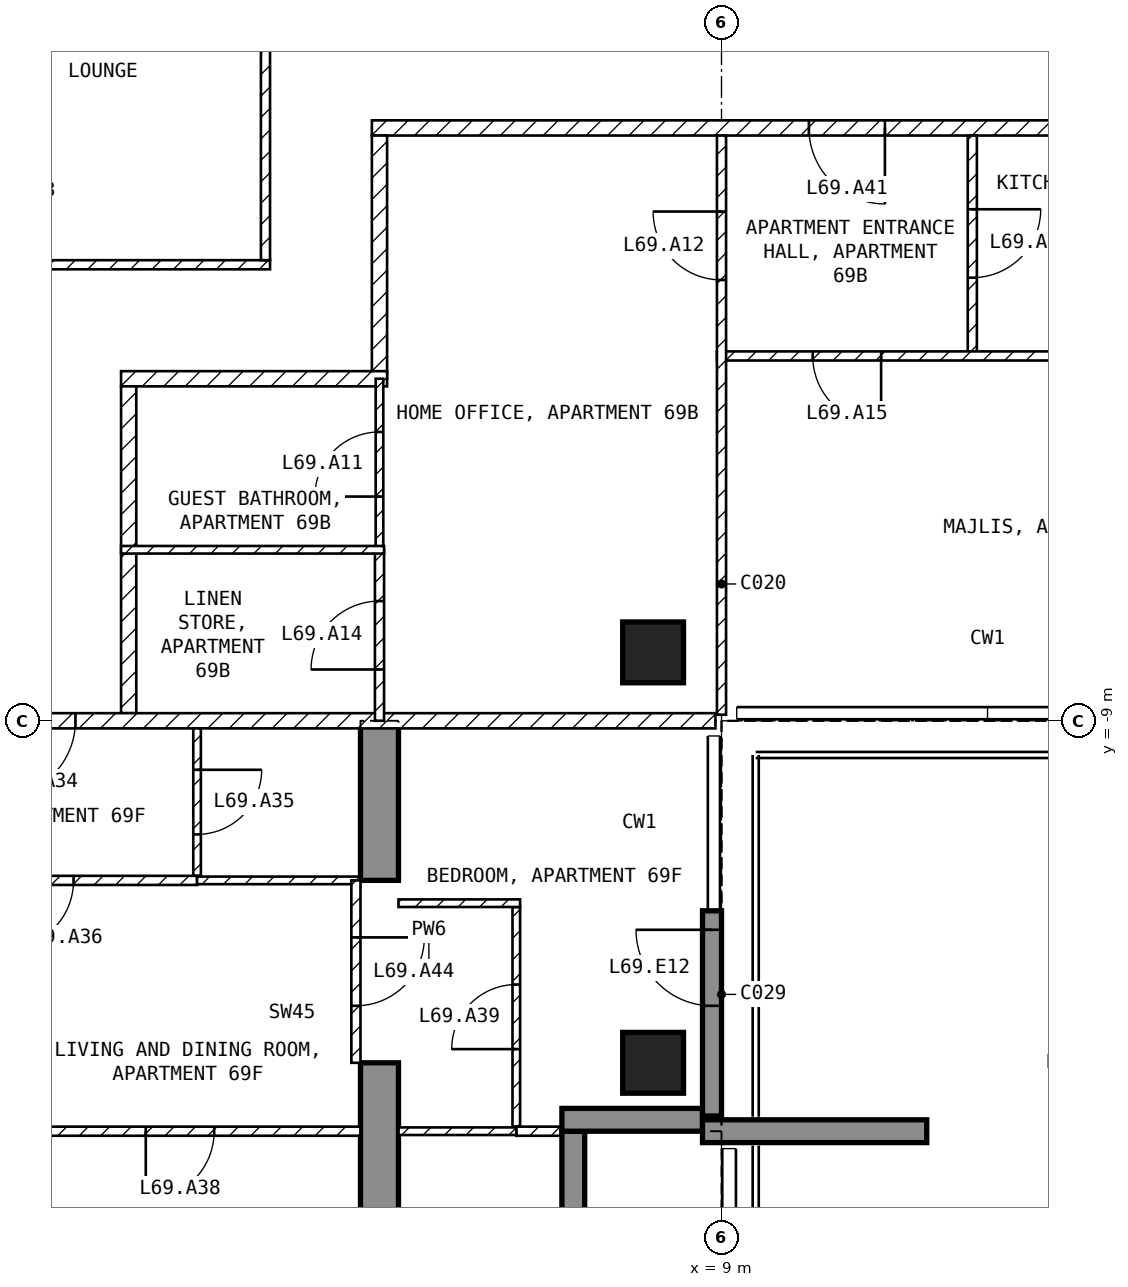
"""IFC4 building model, lengths in metres.
Left out: names, types, materials, properties, quantities, classifications, styles, units other than length and angle.
Written with IfcOpenShell. Run it as: python <this file> out.ifc"""

import sys

from ifc_helpers import new_model, si_unit, direction, frame, frame_2d, origin, origin_2d, place, context, subcontext, project, spatial, polyline, rectangle, outline, extrude, element, fill, save


model = new_model("IFC4")
c1 = context("Model", 3, precision=1e-05, world=origin(), true_north=direction((0.0, 1.0)))
c2 = subcontext(c1, "Body", "Model", "MODEL_VIEW")
j1 = project(units=[si_unit("LENGTHUNIT", "METRE"), si_unit("PLANEANGLEUNIT", "RADIAN")], contexts=[c1])
p1 = place(None, origin())
s1 = spatial("IfcSite", under=j1, at=p1, CompositionType="ELEMENT")
p2 = place(p1, origin())
s2 = spatial("IfcBuilding", under=s1, at=p2, CompositionType="ELEMENT")
p3 = place(p2, frame((0.0, 0.0, 271.0)))
s3 = spatial("IfcBuildingStorey", under=s2, at=p3, CompositionType="ELEMENT", Elevation=271.0)
for number, where, z_axis, x_axis in (
    (1, (8.1, -13.5, -0.25), (0.0, 0.0, 1.0), (1.0, 0.0, 0.0)),
    (2, (8.1, -8.1, -0.25), (0.0, 0.0, 1.0), (1.0, 0.0, 0.0)),
):
    element("IfcColumn", number, at=place(p3, frame(where, z_axis=z_axis, x_axis=x_axis)), inside=s3, PredefinedType="COLUMN", context=c2, shape_type="SweptSolid", body=[
        extrude(rectangle(XDim=0.8, YDim=0.8, at=origin_2d()), origin(), (0.0, 0.0, 1.0), 3.5),
    ])
p4 = place(p3, frame((4.25, -16.7, -0.25), z_axis=(1.0, 0.0, 0.0), x_axis=(0.0, 1.0, 0.0)))
e3 = element("IfcWall", 3, at=p4, inside=s3, PredefinedType="SHEAR", context=c2, shape_type="SweptSolid", body=[
    extrude(outline(polyline([(0.0, 0.0), (3.2, 0.0), (3.2, 2.65), (5.6, 2.65), (5.6, 0.0), (7.7, 0.0), (7.7, 3.5), (0.0, 3.5), (0.0, 0.0)])), origin(), (0.0, 0.0, 1.0), 0.5),
])
p5 = place(p3, frame((8.875, -14.2, 0.0), z_axis=(0.0, 0.0, 1.0), x_axis=(0.0, 1.0, 0.0)))
e4 = element("IfcWall", 4, at=p5, inside=s3, PredefinedType="SOLIDWALL", context=c2, shape_type="SweptSolid", body=[
    extrude(rectangle(XDim=2.7, YDim=0.25, at=frame_2d((1.35, 0.0))), origin(), (0.0, 0.0, 1.0), 3.25),
])
p6 = place(p5, frame((1.45, 0.0, 0.0)))
e5 = element("IfcOpeningElement", 5, at=p6, cuts=e4, PredefinedType="OPENING", context=c2, shape_type="SweptSolid", body=[
    extrude(rectangle(XDim=1.0, YDim=2.4, at=frame_2d((0.5, 1.2))), frame((0.0, 0.135, 0.0), z_axis=(0.0, -1.0, 0.0), x_axis=(1.0, 0.0, 0.0)), (0.0, 0.0, 1.0), 0.27),
])
p7 = place(p3, frame((7.05, -16.2, 0.0), z_axis=(0.0, 0.0, 1.0), x_axis=(0.0, 1.0, 0.0)))
e6 = element("IfcWall", 6, at=p7, inside=s3, PredefinedType="SOLIDWALL", context=c2, shape_type="SweptSolid", body=[
    extrude(rectangle(XDim=1.8, YDim=0.3, at=frame_2d((0.9, 0.0))), origin(), (0.0, 0.0, 1.0), 3.25),
])
p8 = place(p3, frame((6.9, -14.25, 0.0), z_axis=(0.0, 0.0, 1.0), x_axis=(1.0, 0.0, 0.0)))
e7 = element("IfcWall", 7, at=p8, inside=s3, PredefinedType="SOLIDWALL", context=c2, shape_type="SweptSolid", body=[
    extrude(rectangle(XDim=1.85, YDim=0.3, at=frame_2d((0.925, 0.0))), origin(), (0.0, 0.0, 1.0), 3.25),
])
p9 = place(p3, frame((8.75, -14.4, 0.0), z_axis=(0.0, 0.0, 1.0), x_axis=(1.0, 0.0, 0.0)))
e8 = element("IfcWall", 8, at=p9, inside=s3, PredefinedType="SOLIDWALL", context=c2, shape_type="SweptSolid", body=[
    extrude(rectangle(XDim=2.95, YDim=0.3, at=frame_2d((1.475, 0.0))), origin(), (0.0, 0.0, 1.0), 3.25),
])
p10 = place(p3, frame((-3.06, -3.0, 0.0), z_axis=(0.0, 0.0, 1.0), x_axis=(1.0, 0.0, 0.0)))
e9 = element("IfcWall", 9, at=p10, inside=s3, PredefinedType="PARTITIONING", context=c2, shape_type="SweptSolid", body=[
    extrude(rectangle(XDim=6.12, YDim=0.12, at=frame_2d((3.06, 0.0))), origin(), (0.0, 0.0, 1.0), 3.25),
])
p11 = place(p3, frame((3.0, -2.94, 0.0), z_axis=(0.0, 0.0, 1.0), x_axis=(0.0, 1.0, 0.0)))
e10 = element("IfcWall", 10, at=p11, inside=s3, PredefinedType="PARTITIONING", context=c2, shape_type="SweptSolid", body=[
    extrude(rectangle(XDim=5.88, YDim=0.12, at=frame_2d((2.94, 0.0))), origin(), (0.0, 0.0, 1.0), 3.25),
])
p12 = place(p3, frame((21.6, -1.2, 0.0), z_axis=(0.0, 0.0, 1.0), x_axis=(-1.0, 0.0, 0.0)))
e11 = element("IfcWall", 11, at=p12, inside=s3, PredefinedType="PARTITIONING", context=c2, shape_type="SweptSolid", body=[
    extrude(rectangle(XDim=17.2, YDim=0.2, at=frame_2d((8.6, 0.0))), origin(), (0.0, 0.0, 1.0), 3.25),
])
p13 = place(p12, frame((10.45, 0.0, 0.0)))
e12 = element("IfcOpeningElement", 12, at=p13, cuts=e11, PredefinedType="OPENING", context=c2, shape_type="SweptSolid", body=[
    extrude(rectangle(XDim=1.0, YDim=2.1, at=frame_2d((0.5, 1.05))), frame((0.0, 0.11, 0.0), z_axis=(0.0, -1.0, 0.0), x_axis=(1.0, 0.0, 0.0)), (0.0, 0.0, 1.0), 0.22),
])
p14 = place(p3, frame((4.5, -1.3, 0.0), z_axis=(0.0, 0.0, 1.0), x_axis=(0.0, -1.0, 0.0)))
e13 = element("IfcWall", 13, at=p14, inside=s3, PredefinedType="PARTITIONING", context=c2, shape_type="SweptSolid", body=[
    extrude(rectangle(XDim=3.2, YDim=0.2, at=frame_2d((1.6, 0.0))), origin(), (0.0, 0.0, 1.0), 3.25),
])
p15 = place(p3, frame((4.6, -4.5, 0.0), z_axis=(0.0, 0.0, 1.0), x_axis=(-1.0, 0.0, 0.0)))
e14 = element("IfcWall", 14, at=p15, inside=s3, PredefinedType="PARTITIONING", context=c2, shape_type="SweptSolid", body=[
    extrude(rectangle(XDim=3.5, YDim=0.2, at=frame_2d((1.75, 0.0))), origin(), (0.0, 0.0, 1.0), 3.25),
])
p16 = place(p3, frame((1.2, -4.6, 0.0), z_axis=(0.0, 0.0, 1.0), x_axis=(0.0, -1.0, 0.0)))
e15 = element("IfcWall", 15, at=p16, inside=s3, PredefinedType="PARTITIONING", context=c2, shape_type="SweptSolid", body=[
    extrude(rectangle(XDim=4.3, YDim=0.2, at=frame_2d((2.15, 0.0))), origin(), (0.0, 0.0, 1.0), 3.25),
])
p17 = place(p3, frame((8.92, -9.0, 0.0), z_axis=(0.0, 0.0, 1.0), x_axis=(-1.0, 0.0, 0.0)))
e16 = element("IfcWall", 16, at=p17, inside=s3, PredefinedType="PARTITIONING", context=c2, shape_type="SweptSolid", body=[
    extrude(rectangle(XDim=17.84, YDim=0.2, at=frame_2d((8.92, 0.0))), origin(), (0.0, 0.0, 1.0), 3.25),
])
p18 = place(p17, frame((8.42, 0.0, 0.0)))
e17 = element("IfcOpeningElement", 17, at=p18, cuts=e16, PredefinedType="OPENING", context=c2, shape_type="SweptSolid", body=[
    extrude(rectangle(XDim=1.0, YDim=2.1, at=frame_2d((0.5, 1.05))), frame((0.0, 0.11, 0.0), z_axis=(0.0, -1.0, 0.0), x_axis=(1.0, 0.0, 0.0)), (0.0, 0.0, 1.0), 0.22),
])
p19 = place(p3, frame((12.3, -1.3, 0.0), z_axis=(0.0, 0.0, 1.0), x_axis=(0.0, -1.0, 0.0)))
e18 = element("IfcWall", 18, at=p19, inside=s3, PredefinedType="PARTITIONING", context=c2, shape_type="SweptSolid", body=[
    extrude(rectangle(XDim=2.84, YDim=0.12, at=frame_2d((1.42, 0.0))), origin(), (0.0, 0.0, 1.0), 3.25),
])
p20 = place(p19, frame((0.97, 0.0, 0.0)))
e19 = element("IfcOpeningElement", 19, at=p20, cuts=e18, PredefinedType="OPENING", context=c2, shape_type="SweptSolid", body=[
    extrude(rectangle(XDim=0.9, YDim=2.1, at=frame_2d((0.45, 1.05))), frame((0.0, 0.07, 0.0), z_axis=(0.0, -1.0, 0.0), x_axis=(1.0, 0.0, 0.0)), (0.0, 0.0, 1.0), 0.14),
])
p21 = place(p3, frame((15.6, -4.2, 0.0), z_axis=(0.0, 0.0, 1.0), x_axis=(-1.0, 0.0, 0.0)))
e20 = element("IfcWall", 20, at=p21, inside=s3, PredefinedType="PARTITIONING", context=c2, shape_type="SweptSolid", body=[
    extrude(rectangle(XDim=6.66, YDim=0.12, at=frame_2d((3.33, 0.0))), origin(), (0.0, 0.0, 1.0), 3.25),
])
p22 = place(p21, frame((4.5, 0.0, 0.0)))
e21 = element("IfcOpeningElement", 21, at=p22, cuts=e20, PredefinedType="OPENING", context=c2, shape_type="SweptSolid", body=[
    extrude(rectangle(XDim=0.9, YDim=2.1, at=frame_2d((0.45, 1.05))), frame((0.0, 0.07, 0.0), z_axis=(0.0, -1.0, 0.0), x_axis=(1.0, 0.0, 0.0)), (0.0, 0.0, 1.0), 0.14),
])
p23 = place(p3, frame((9.0, -8.92, 0.0), z_axis=(0.0, 0.0, 1.0), x_axis=(0.0, 1.0, 0.0)))
e22 = element("IfcWall", 22, at=p23, inside=s3, PredefinedType="PARTITIONING", context=c2, shape_type="SweptSolid", body=[
    extrude(rectangle(XDim=7.62, YDim=0.12, at=frame_2d((3.81, 0.0))), origin(), (0.0, 0.0, 1.0), 3.25),
])
p24 = place(p23, frame((5.72, 0.0, 0.0)))
e23 = element("IfcOpeningElement", 23, at=p24, cuts=e22, PredefinedType="OPENING", context=c2, shape_type="SweptSolid", body=[
    extrude(rectangle(XDim=0.9, YDim=2.1, at=frame_2d((0.45, 1.05))), frame((0.0, 0.07, 0.0), z_axis=(0.0, -1.0, 0.0), x_axis=(1.0, 0.0, 0.0)), (0.0, 0.0, 1.0), 0.14),
])
p25 = place(p3, frame((4.5, -6.75, 0.0), z_axis=(0.0, 0.0, 1.0), x_axis=(0.0, 1.0, 0.0)))
e24 = element("IfcWall", 24, at=p25, inside=s3, PredefinedType="PARTITIONING", context=c2, shape_type="SweptSolid", body=[
    extrude(rectangle(XDim=2.25, YDim=0.1, at=frame_2d((1.125, 0.0))), origin(), (0.0, 0.0, 1.0), 3.25),
])
p26 = place(p25, frame((0.7, 0.0, 0.0)))
e25 = element("IfcOpeningElement", 25, at=p26, cuts=e24, PredefinedType="OPENING", context=c2, shape_type="SweptSolid", body=[
    extrude(rectangle(XDim=0.85, YDim=2.1, at=frame_2d((0.425, 1.05))), frame((0.0, 0.06, 0.0), z_axis=(0.0, -1.0, 0.0), x_axis=(1.0, 0.0, 0.0)), (0.0, 0.0, 1.0), 0.12),
])
p27 = place(p3, frame((4.5, -9.0, 0.0), z_axis=(0.0, 0.0, 1.0), x_axis=(0.0, 1.0, 0.0)))
e26 = element("IfcWall", 26, at=p27, inside=s3, PredefinedType="PARTITIONING", context=c2, shape_type="SweptSolid", body=[
    extrude(rectangle(XDim=2.25, YDim=0.12, at=frame_2d((1.125, 0.0))), origin(), (0.0, 0.0, 1.0), 3.25),
])
p28 = place(p27, frame((0.675, 0.0, 0.0)))
e27 = element("IfcOpeningElement", 27, at=p28, cuts=e26, PredefinedType="OPENING", context=c2, shape_type="SweptSolid", body=[
    extrude(rectangle(XDim=0.9, YDim=2.1, at=frame_2d((0.45, 1.05))), frame((0.0, 0.07, 0.0), z_axis=(0.0, -1.0, 0.0), x_axis=(1.0, 0.0, 0.0)), (0.0, 0.0, 1.0), 0.14),
])
p29 = place(p3, frame((4.56, -6.75, 0.0), z_axis=(0.0, 0.0, 1.0), x_axis=(-1.0, 0.0, 0.0)))
e28 = element("IfcWall", 28, at=p29, inside=s3, PredefinedType="PARTITIONING", context=c2, shape_type="SweptSolid", body=[
    extrude(rectangle(XDim=3.46, YDim=0.1, at=frame_2d((1.73, 0.0))), origin(), (0.0, 0.0, 1.0), 3.25),
])
p30 = place(p3, frame((2.1, -9.1, 0.0), z_axis=(0.0, 0.0, 1.0), x_axis=(0.0, -1.0, 0.0)))
e29 = element("IfcWall", 29, at=p30, inside=s3, PredefinedType="PARTITIONING", context=c2, shape_type="SweptSolid", body=[
    extrude(rectangle(XDim=1.94, YDim=0.1, at=frame_2d((0.97, 0.0))), origin(), (0.0, 0.0, 1.0), 3.25),
])
p31 = place(p30, frame((0.545, 0.0, 0.0)))
e30 = element("IfcOpeningElement", 30, at=p31, cuts=e29, PredefinedType="OPENING", context=c2, shape_type="SweptSolid", body=[
    extrude(rectangle(XDim=0.85, YDim=2.1, at=frame_2d((0.425, 1.05))), frame((0.0, 0.06, 0.0), z_axis=(0.0, -1.0, 0.0), x_axis=(1.0, 0.0, 0.0)), (0.0, 0.0, 1.0), 0.12),
])
p32 = place(p3, frame((2.1, -11.1, 0.0), z_axis=(0.0, 0.0, 1.0), x_axis=(-1.0, 0.0, 0.0)))
e31 = element("IfcWall", 31, at=p32, inside=s3, PredefinedType="PARTITIONING", context=c2, shape_type="SweptSolid", body=[
    extrude(rectangle(XDim=6.35, YDim=0.12, at=frame_2d((3.175, 0.0))), origin(), (0.0, 0.0, 1.0), 3.25),
])
p33 = place(p32, frame((1.625, 0.0, 0.0)))
e32 = element("IfcOpeningElement", 32, at=p33, cuts=e31, PredefinedType="OPENING", context=c2, shape_type="SweptSolid", body=[
    extrude(rectangle(XDim=0.9, YDim=2.1, at=frame_2d((0.45, 1.05))), frame((0.0, 0.07, 0.0), z_axis=(0.0, -1.0, 0.0), x_axis=(1.0, 0.0, 0.0)), (0.0, 0.0, 1.0), 0.14),
])
p34 = place(p3, frame((4.25, -11.1, 0.0), z_axis=(0.0, 0.0, 1.0), x_axis=(-1.0, 0.0, 0.0)))
e33 = element("IfcWall", 33, at=p34, inside=s3, PredefinedType="PARTITIONING", context=c2, shape_type="SweptSolid", body=[
    extrude(rectangle(XDim=2.15, YDim=0.1, at=frame_2d((1.075, 0.0))), origin(), (0.0, 0.0, 1.0), 3.25),
])
p35 = place(p3, frame((4.25, -14.4, 0.0), z_axis=(0.0, 0.0, 1.0), x_axis=(-1.0, 0.0, 0.0)))
e34 = element("IfcWall", 34, at=p35, inside=s3, PredefinedType="PARTITIONING", context=c2, shape_type="SweptSolid", body=[
    extrude(rectangle(XDim=8.5, YDim=0.12, at=frame_2d((4.25, 0.0))), origin(), (0.0, 0.0, 1.0), 3.25),
])
p36 = place(p35, frame((1.925, 0.0, 0.0)))
e35 = element("IfcOpeningElement", 35, at=p36, cuts=e34, PredefinedType="OPENING", context=c2, shape_type="SweptSolid", body=[
    extrude(rectangle(XDim=0.9, YDim=2.1, at=frame_2d((0.45, 1.05))), frame((0.0, 0.07, 0.0), z_axis=(0.0, -1.0, 0.0), x_axis=(1.0, 0.0, 0.0)), (0.0, 0.0, 1.0), 0.14),
])
p37 = place(p3, frame((6.3, -14.34, 0.0), z_axis=(0.0, 0.0, 1.0), x_axis=(0.0, 1.0, 0.0)))
e36 = element("IfcWall", 36, at=p37, inside=s3, PredefinedType="PARTITIONING", context=c2, shape_type="SweptSolid", body=[
    extrude(rectangle(XDim=2.89, YDim=0.1, at=frame_2d((1.445, 0.0))), origin(), (0.0, 0.0, 1.0), 3.25),
])
p38 = place(p37, frame((1.02, 0.0, 0.0)))
e37 = element("IfcOpeningElement", 37, at=p38, cuts=e36, PredefinedType="OPENING", context=c2, shape_type="SweptSolid", body=[
    extrude(rectangle(XDim=0.85, YDim=2.1, at=frame_2d((0.425, 1.05))), frame((0.0, 0.06, 0.0), z_axis=(0.0, -1.0, 0.0), x_axis=(1.0, 0.0, 0.0)), (0.0, 0.0, 1.0), 0.12),
])
p39 = place(p3, frame((6.35, -11.4, 0.0), z_axis=(0.0, 0.0, 1.0), x_axis=(-1.0, 0.0, 0.0)))
e38 = element("IfcWall", 38, at=p39, inside=s3, PredefinedType="PARTITIONING", context=c2, shape_type="SweptSolid", body=[
    extrude(rectangle(XDim=1.6, YDim=0.1, at=frame_2d((0.8, 0.0))), origin(), (0.0, 0.0, 1.0), 3.25),
])
p40 = place(p3, frame((7.12, -14.4, 0.0), z_axis=(0.0, 0.0, 1.0), x_axis=(-1.0, 0.0, 0.0)))
e39 = element("IfcWall", 39, at=p40, inside=s3, PredefinedType="PARTITIONING", context=c2, shape_type="SweptSolid", body=[
    extrude(rectangle(XDim=0.82, YDim=0.12, at=frame_2d((0.41, 0.0))), origin(), (0.0, 0.0, 1.0), 3.25),
])
p41 = place(p3, frame((6.3, -14.4, 0.0), z_axis=(0.0, 0.0, 1.0), x_axis=(-1.0, 0.0, 0.0)))
e40 = element("IfcWall", 40, at=p41, inside=s3, PredefinedType="PARTITIONING", context=c2, shape_type="SweptSolid", body=[
    extrude(rectangle(XDim=1.55, YDim=0.1, at=frame_2d((0.775, 0.0))), origin(), (0.0, 0.0, 1.0), 3.25),
])
p42 = place(p3, frame((4.19, -11.1, 0.0), z_axis=(0.0, 0.0, 1.0), x_axis=(0.0, -1.0, 0.0)))
e41 = element("IfcWall", 41, at=p42, inside=s3, PredefinedType="PARTITIONING", context=c2, shape_type="SweptSolid", body=[
    extrude(rectangle(XDim=2.4, YDim=0.12, at=frame_2d((1.2, 0.0))), origin(), (0.0, 0.0, 1.0), 2.4),
])
p43 = place(p42, frame((0.75, 0.0, 0.0)))
e42 = element("IfcOpeningElement", 42, at=p43, cuts=e41, PredefinedType="OPENING", context=c2, shape_type="SweptSolid", body=[
    extrude(rectangle(XDim=0.9, YDim=2.1, at=frame_2d((0.45, 1.05))), frame((0.0, 0.07, 0.0), z_axis=(0.0, -1.0, 0.0), x_axis=(1.0, 0.0, 0.0)), (0.0, 0.0, 1.0), 0.14),
])
p44 = place(p6, origin())
e43 = element("IfcDoor", 43, at=p44, inside=s3, OperationType="SINGLE_SWING_RIGHT", PredefinedType="DOOR", context=c2, shape_type="SweptSolid", body=[
    extrude(rectangle(XDim=1.0, YDim=2.4, at=frame_2d((0.5, 1.2))), frame((0.0, 0.025, 0.0), z_axis=(0.0, -1.0, 0.0), x_axis=(1.0, 0.0, 0.0)), (0.0, 0.0, 1.0), 0.05),
])
fill(e5, e43)
p45 = place(p26, origin())
e44 = element("IfcDoor", 44, at=p45, inside=s3, OperationType="SINGLE_SWING_LEFT", PredefinedType="DOOR", context=c2, shape_type="SweptSolid", body=[
    extrude(rectangle(XDim=0.85, YDim=2.1, at=frame_2d((0.425, 1.05))), frame((0.0, 0.025, 0.0), z_axis=(0.0, -1.0, 0.0), x_axis=(1.0, 0.0, 0.0)), (0.0, 0.0, 1.0), 0.05),
])
fill(e25, e44)
p46 = place(p24, origin())
e45 = element("IfcDoor", 45, at=p46, inside=s3, OperationType="SINGLE_SWING_RIGHT", PredefinedType="DOOR", context=c2, shape_type="SweptSolid", body=[
    extrude(rectangle(XDim=0.9, YDim=2.1, at=frame_2d((0.45, 1.05))), frame((0.0, 0.025, 0.0), z_axis=(0.0, -1.0, 0.0), x_axis=(1.0, 0.0, 0.0)), (0.0, 0.0, 1.0), 0.05),
])
fill(e23, e45)
p47 = place(p20, origin())
e46 = element("IfcDoor", 46, at=p47, inside=s3, OperationType="SINGLE_SWING_LEFT", PredefinedType="DOOR", context=c2, shape_type="SweptSolid", body=[
    extrude(rectangle(XDim=0.9, YDim=2.1, at=frame_2d((0.45, 1.05))), frame((0.0, 0.025, 0.0), z_axis=(0.0, -1.0, 0.0), x_axis=(1.0, 0.0, 0.0)), (0.0, 0.0, 1.0), 0.05),
])
fill(e19, e46)
p48 = place(p28, origin())
e47 = element("IfcDoor", 47, at=p48, inside=s3, OperationType="SINGLE_SWING_LEFT", PredefinedType="DOOR", context=c2, shape_type="SweptSolid", body=[
    extrude(rectangle(XDim=0.9, YDim=2.1, at=frame_2d((0.45, 1.05))), frame((0.0, 0.025, 0.0), z_axis=(0.0, -1.0, 0.0), x_axis=(1.0, 0.0, 0.0)), (0.0, 0.0, 1.0), 0.05),
])
fill(e27, e47)
p49 = place(p22, origin())
e48 = element("IfcDoor", 48, at=p49, inside=s3, OperationType="SINGLE_SWING_LEFT", PredefinedType="DOOR", context=c2, shape_type="SweptSolid", body=[
    extrude(rectangle(XDim=0.9, YDim=2.1, at=frame_2d((0.45, 1.05))), frame((0.0, 0.025, 0.0), z_axis=(0.0, -1.0, 0.0), x_axis=(1.0, 0.0, 0.0)), (0.0, 0.0, 1.0), 0.05),
])
fill(e21, e48)
p50 = place(p18, origin())
e49 = element("IfcDoor", 49, at=p50, inside=s3, OperationType="SINGLE_SWING_RIGHT", PredefinedType="DOOR", context=c2, shape_type="SweptSolid", body=[
    extrude(rectangle(XDim=1.0, YDim=2.1, at=frame_2d((0.5, 1.05))), frame((0.0, 0.025, 0.0), z_axis=(0.0, -1.0, 0.0), x_axis=(1.0, 0.0, 0.0)), (0.0, 0.0, 1.0), 0.05),
])
fill(e17, e49)
p51 = place(p31, origin())
e50 = element("IfcDoor", 50, at=p51, inside=s3, OperationType="SINGLE_SWING_LEFT", PredefinedType="DOOR", context=c2, shape_type="SweptSolid", body=[
    extrude(rectangle(XDim=0.85, YDim=2.1, at=frame_2d((0.425, 1.05))), frame((0.0, 0.025, 0.0), z_axis=(0.0, -1.0, 0.0), x_axis=(1.0, 0.0, 0.0)), (0.0, 0.0, 1.0), 0.05),
])
fill(e30, e50)
p52 = place(p33, origin())
e51 = element("IfcDoor", 51, at=p52, inside=s3, OperationType="SINGLE_SWING_RIGHT", PredefinedType="DOOR", context=c2, shape_type="SweptSolid", body=[
    extrude(rectangle(XDim=0.9, YDim=2.1, at=frame_2d((0.45, 1.05))), frame((0.0, 0.025, 0.0), z_axis=(0.0, -1.0, 0.0), x_axis=(1.0, 0.0, 0.0)), (0.0, 0.0, 1.0), 0.05),
])
fill(e32, e51)
p53 = place(p36, origin())
e52 = element("IfcDoor", 52, at=p53, inside=s3, OperationType="SINGLE_SWING_RIGHT", PredefinedType="DOOR", context=c2, shape_type="SweptSolid", body=[
    extrude(rectangle(XDim=0.9, YDim=2.1, at=frame_2d((0.45, 1.05))), frame((0.0, 0.025, 0.0), z_axis=(0.0, -1.0, 0.0), x_axis=(1.0, 0.0, 0.0)), (0.0, 0.0, 1.0), 0.05),
])
fill(e35, e52)
p54 = place(p38, origin())
e53 = element("IfcDoor", 53, at=p54, inside=s3, OperationType="SINGLE_SWING_LEFT", PredefinedType="DOOR", context=c2, shape_type="SweptSolid", body=[
    extrude(rectangle(XDim=0.85, YDim=2.1, at=frame_2d((0.425, 1.05))), frame((0.0, 0.025, 0.0), z_axis=(0.0, -1.0, 0.0), x_axis=(1.0, 0.0, 0.0)), (0.0, 0.0, 1.0), 0.05),
])
fill(e37, e53)
p55 = place(p13, origin())
e54 = element("IfcDoor", 54, at=p55, inside=s3, OperationType="SINGLE_SWING_LEFT", PredefinedType="DOOR", context=c2, shape_type="SweptSolid", body=[
    extrude(rectangle(XDim=1.0, YDim=2.1, at=frame_2d((0.5, 1.05))), frame((0.0, 0.025, 0.0), z_axis=(0.0, -1.0, 0.0), x_axis=(1.0, 0.0, 0.0)), (0.0, 0.0, 1.0), 0.05),
])
fill(e12, e54)
p56 = place(p43, origin())
e55 = element("IfcDoor", 55, at=p56, inside=s3, OperationType="SINGLE_SWING_LEFT", PredefinedType="DOOR", context=c2, shape_type="SweptSolid", body=[
    extrude(rectangle(XDim=0.9, YDim=2.1, at=frame_2d((0.45, 1.05))), frame((0.0, 0.025, 0.0), z_axis=(0.0, -1.0, 0.0), x_axis=(1.0, 0.0, 0.0)), (0.0, 0.0, 1.0), 0.05),
])
fill(e42, e55)
save(model, sys.argv[1])
